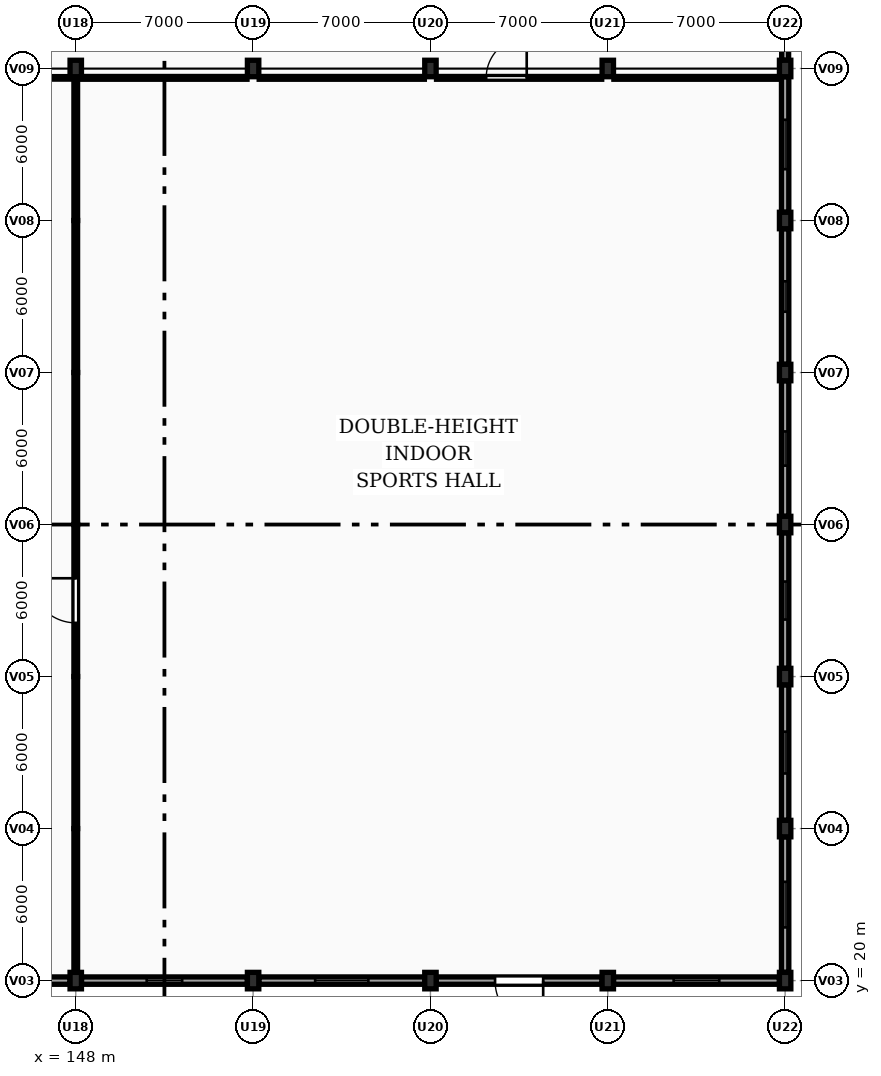
"""IFC4 building model, lengths in metres.
Left out: names, types, materials, properties, quantities, classifications, styles, units other than length and angle.
Written with IfcOpenShell. Run it as: python <this file> out.ifc"""

import sys

from ifc_helpers import new_model, si_unit, direction, frame, frame_2d, origin, origin_2d, place, context, subcontext, project, spatial, rectangle, extrude, element, fill, save


model = new_model("IFC4")
c1 = context("Model", 3, precision=1e-05, world=origin(), true_north=direction((0.0, 1.0)))
c2 = subcontext(c1, "Body", "Model", "MODEL_VIEW")
j1 = project(units=[si_unit("LENGTHUNIT", "METRE"), si_unit("PLANEANGLEUNIT", "RADIAN")], contexts=[c1])
p1 = place(None, origin())
s1 = spatial("IfcSite", under=j1, at=p1, CompositionType="ELEMENT")
p2 = place(p1, origin())
s2 = spatial("IfcBuilding", under=s1, at=p2, CompositionType="ELEMENT")
p3 = place(p2, origin())
s3 = spatial("IfcBuildingStorey", under=s2, at=p3, CompositionType="ELEMENT", Elevation=0.0)
for number, where, z_axis, x_axis in (
    (1, (148.0, 20.0, -0.2), (0.0, 0.0, 1.0), (1.0, 0.0, 0.0)),
    (2, (148.0, 56.0, -0.2), (0.0, 0.0, 1.0), (1.0, 0.0, 0.0)),
    (3, (155.0, 20.0, -0.2), (0.0, 0.0, 1.0), (1.0, 0.0, 0.0)),
    (4, (155.0, 56.0, -0.2), (0.0, 0.0, 1.0), (1.0, 0.0, 0.0)),
    (5, (162.0, 20.0, -0.2), (0.0, 0.0, 1.0), (1.0, 0.0, 0.0)),
    (6, (162.0, 56.0, -0.2), (0.0, 0.0, 1.0), (1.0, 0.0, 0.0)),
    (7, (169.0, 20.0, -0.2), (0.0, 0.0, 1.0), (1.0, 0.0, 0.0)),
    (8, (169.0, 56.0, -0.2), (0.0, 0.0, 1.0), (1.0, 0.0, 0.0)),
    (9, (176.0, 20.0, -0.2), (0.0, 0.0, 1.0), (1.0, 0.0, 0.0)),
    (10, (176.0, 26.0, -0.2), (0.0, 0.0, 1.0), (1.0, 0.0, 0.0)),
    (11, (176.0, 32.0, -0.2), (0.0, 0.0, 1.0), (1.0, 0.0, 0.0)),
    (12, (176.0, 38.0, -0.2), (0.0, 0.0, 1.0), (1.0, 0.0, 0.0)),
    (13, (176.0, 44.0, -0.2), (0.0, 0.0, 1.0), (1.0, 0.0, 0.0)),
    (14, (176.0, 50.0, -0.2), (0.0, 0.0, 1.0), (1.0, 0.0, 0.0)),
    (15, (176.0, 56.0, -0.2), (0.0, 0.0, 1.0), (1.0, 0.0, 0.0)),
):
    element("IfcColumn", number, at=place(p3, frame(where, z_axis=z_axis, x_axis=x_axis)), inside=s3, PredefinedType="COLUMN", context=c2, shape_type="SweptSolid", body=[
        extrude(rectangle(XDim=0.45, YDim=0.65, at=origin_2d()), origin(), (0.0, 0.0, 1.0), 4.7),
    ])
p4 = place(p3, frame((175.775, 20.0, 0.0), z_axis=(0.0, 0.0, 1.0), x_axis=(-1.0, 0.0, 0.0)))
e16 = element("IfcWall", 16, at=p4, inside=s3, PredefinedType="SOLIDWALL", context=c2, shape_type="SweptSolid", body=[
    extrude(rectangle(XDim=6.55, YDim=0.29, at=frame_2d((3.275, 0.0))), origin(), (0.0, 0.0, 1.0), 3.54),
])
p5 = place(p4, frame((2.375, 0.0, 0.95)))
e17 = element("IfcOpeningElement", 17, at=p5, cuts=e16, PredefinedType="OPENING", context=c2, shape_type="SweptSolid", body=[
    extrude(rectangle(XDim=1.8, YDim=1.2, at=frame_2d((0.9, 0.6))), frame((0.0, 0.155, 0.0), z_axis=(0.0, -1.0, 0.0), x_axis=(1.0, 0.0, 0.0)), (0.0, 0.0, 1.0), 0.31),
])
p6 = place(p3, frame((168.775, 20.0, 0.0), z_axis=(0.0, 0.0, 1.0), x_axis=(-1.0, 0.0, 0.0)))
e18 = element("IfcWall", 18, at=p6, inside=s3, PredefinedType="SOLIDWALL", context=c2, shape_type="SweptSolid", body=[
    extrude(rectangle(XDim=6.55, YDim=0.29, at=frame_2d((3.275, 0.0))), origin(), (0.0, 0.0, 1.0), 3.54),
])
p7 = place(p6, frame((2.325, 0.0, 0.0)))
e19 = element("IfcOpeningElement", 19, at=p7, cuts=e18, PredefinedType="OPENING", context=c2, shape_type="SweptSolid", body=[
    extrude(rectangle(XDim=1.9, YDim=2.25, at=frame_2d((0.95, 1.125))), frame((0.0, 0.155, 0.0), z_axis=(0.0, -1.0, 0.0), x_axis=(1.0, 0.0, 0.0)), (0.0, 0.0, 1.0), 0.31),
])
p8 = place(p3, frame((161.775, 20.0, 0.0), z_axis=(0.0, 0.0, 1.0), x_axis=(-1.0, 0.0, 0.0)))
e20 = element("IfcWall", 20, at=p8, inside=s3, PredefinedType="SOLIDWALL", context=c2, shape_type="SweptSolid", body=[
    extrude(rectangle(XDim=6.55, YDim=0.29, at=frame_2d((3.275, 0.0))), origin(), (0.0, 0.0, 1.0), 3.54),
])
p9 = place(p8, frame((2.225, 0.0, 0.95)))
e21 = element("IfcOpeningElement", 21, at=p9, cuts=e20, PredefinedType="OPENING", context=c2, shape_type="SweptSolid", body=[
    extrude(rectangle(XDim=2.1, YDim=1.2, at=frame_2d((1.05, 0.6))), frame((0.0, 0.155, 0.0), z_axis=(0.0, -1.0, 0.0), x_axis=(1.0, 0.0, 0.0)), (0.0, 0.0, 1.0), 0.31),
])
p10 = place(p3, frame((154.775, 20.0, 0.0), z_axis=(0.0, 0.0, 1.0), x_axis=(-1.0, 0.0, 0.0)))
e22 = element("IfcWall", 22, at=p10, inside=s3, PredefinedType="SOLIDWALL", context=c2, shape_type="SweptSolid", body=[
    extrude(rectangle(XDim=6.55, YDim=0.29, at=frame_2d((3.275, 0.0))), origin(), (0.0, 0.0, 1.0), 3.54),
])
p11 = place(p10, frame((2.575, 0.0, 0.95)))
e23 = element("IfcOpeningElement", 23, at=p11, cuts=e22, PredefinedType="OPENING", context=c2, shape_type="SweptSolid", body=[
    extrude(rectangle(XDim=1.4, YDim=1.8, at=frame_2d((0.7, 0.9))), frame((0.0, 0.155, 0.0), z_axis=(0.0, -1.0, 0.0), x_axis=(1.0, 0.0, 0.0)), (0.0, 0.0, 1.0), 0.31),
])
p12 = place(p3, frame((147.775, 20.0, 0.0), z_axis=(0.0, 0.0, 1.0), x_axis=(-1.0, 0.0, 0.0)))
e24 = element("IfcWall", 24, at=p12, inside=s3, PredefinedType="SOLIDWALL", context=c2, shape_type="SweptSolid", body=[
    extrude(rectangle(XDim=6.55, YDim=0.29, at=frame_2d((3.275, 0.0))), origin(), (0.0, 0.0, 1.0), 3.54),
])
p13 = place(p12, frame((2.425, 0.0, 0.95)))
e25 = element("IfcOpeningElement", 25, at=p13, cuts=e24, PredefinedType="OPENING", context=c2, shape_type="SweptSolid", body=[
    extrude(rectangle(XDim=1.7, YDim=1.8, at=frame_2d((0.85, 0.9))), frame((0.0, 0.155, 0.0), z_axis=(0.0, -1.0, 0.0), x_axis=(1.0, 0.0, 0.0)), (0.0, 0.0, 1.0), 0.31),
])
p14 = place(p3, frame((176.0, 55.675, 0.0), z_axis=(0.0, 0.0, 1.0), x_axis=(0.0, -1.0, 0.0)))
e26 = element("IfcWall", 26, at=p14, inside=s3, PredefinedType="SOLIDWALL", context=c2, shape_type="SweptSolid", body=[
    extrude(rectangle(XDim=5.35, YDim=0.29, at=frame_2d((2.675, 0.0))), origin(), (0.0, 0.0, 1.0), 3.54),
])
p15 = place(p14, frame((1.7, 0.0, 0.95)))
e27 = element("IfcOpeningElement", 27, at=p15, cuts=e26, PredefinedType="OPENING", context=c2, shape_type="SweptSolid", body=[
    extrude(rectangle(XDim=1.95, YDim=1.4, at=frame_2d((0.975, 0.7))), frame((0.0, 0.155, 0.0), z_axis=(0.0, -1.0, 0.0), x_axis=(1.0, 0.0, 0.0)), (0.0, 0.0, 1.0), 0.31),
])
p16 = place(p3, frame((176.0, 49.675, 0.0), z_axis=(0.0, 0.0, 1.0), x_axis=(0.0, -1.0, 0.0)))
e28 = element("IfcWall", 28, at=p16, inside=s3, PredefinedType="SOLIDWALL", context=c2, shape_type="SweptSolid", body=[
    extrude(rectangle(XDim=5.35, YDim=0.29, at=frame_2d((2.675, 0.0))), origin(), (0.0, 0.0, 1.0), 3.54),
])
p17 = place(p16, frame((2.075, 0.0, 0.95)))
e29 = element("IfcOpeningElement", 29, at=p17, cuts=e28, PredefinedType="OPENING", context=c2, shape_type="SweptSolid", body=[
    extrude(rectangle(XDim=1.2, YDim=1.5, at=frame_2d((0.6, 0.75))), frame((0.0, 0.155, 0.0), z_axis=(0.0, -1.0, 0.0), x_axis=(1.0, 0.0, 0.0)), (0.0, 0.0, 1.0), 0.31),
])
p18 = place(p3, frame((176.0, 43.675, 0.0), z_axis=(0.0, 0.0, 1.0), x_axis=(0.0, -1.0, 0.0)))
e30 = element("IfcWall", 30, at=p18, inside=s3, PredefinedType="SOLIDWALL", context=c2, shape_type="SweptSolid", body=[
    extrude(rectangle(XDim=5.35, YDim=0.29, at=frame_2d((2.675, 0.0))), origin(), (0.0, 0.0, 1.0), 3.54),
])
p19 = place(p18, frame((2.0, 0.0, 0.95)))
e31 = element("IfcOpeningElement", 31, at=p19, cuts=e30, PredefinedType="OPENING", context=c2, shape_type="SweptSolid", body=[
    extrude(rectangle(XDim=1.35, YDim=1.5, at=frame_2d((0.675, 0.75))), frame((0.0, 0.155, 0.0), z_axis=(0.0, -1.0, 0.0), x_axis=(1.0, 0.0, 0.0)), (0.0, 0.0, 1.0), 0.31),
])
p20 = place(p3, frame((176.0, 37.675, 0.0), z_axis=(0.0, 0.0, 1.0), x_axis=(0.0, -1.0, 0.0)))
e32 = element("IfcWall", 32, at=p20, inside=s3, PredefinedType="SOLIDWALL", context=c2, shape_type="SweptSolid", body=[
    extrude(rectangle(XDim=5.35, YDim=0.29, at=frame_2d((2.675, 0.0))), origin(), (0.0, 0.0, 1.0), 3.54),
])
p21 = place(p20, frame((1.925, 0.0, 0.95)))
e33 = element("IfcOpeningElement", 33, at=p21, cuts=e32, PredefinedType="OPENING", context=c2, shape_type="SweptSolid", body=[
    extrude(rectangle(XDim=1.5, YDim=1.5, at=frame_2d((0.75, 0.75))), frame((0.0, 0.155, 0.0), z_axis=(0.0, -1.0, 0.0), x_axis=(1.0, 0.0, 0.0)), (0.0, 0.0, 1.0), 0.31),
])
p22 = place(p3, frame((176.0, 31.675, 0.0), z_axis=(0.0, 0.0, 1.0), x_axis=(0.0, -1.0, 0.0)))
e34 = element("IfcWall", 34, at=p22, inside=s3, PredefinedType="SOLIDWALL", context=c2, shape_type="SweptSolid", body=[
    extrude(rectangle(XDim=5.35, YDim=0.29, at=frame_2d((2.675, 0.0))), origin(), (0.0, 0.0, 1.0), 3.54),
])
p23 = place(p22, frame((1.85, 0.0, 0.95)))
e35 = element("IfcOpeningElement", 35, at=p23, cuts=e34, PredefinedType="OPENING", context=c2, shape_type="SweptSolid", body=[
    extrude(rectangle(XDim=1.65, YDim=1.5, at=frame_2d((0.825, 0.75))), frame((0.0, 0.155, 0.0), z_axis=(0.0, -1.0, 0.0), x_axis=(1.0, 0.0, 0.0)), (0.0, 0.0, 1.0), 0.31),
])
p24 = place(p3, frame((176.0, 25.675, 0.0), z_axis=(0.0, 0.0, 1.0), x_axis=(0.0, -1.0, 0.0)))
e36 = element("IfcWall", 36, at=p24, inside=s3, PredefinedType="SOLIDWALL", context=c2, shape_type="SweptSolid", body=[
    extrude(rectangle(XDim=5.35, YDim=0.29, at=frame_2d((2.675, 0.0))), origin(), (0.0, 0.0, 1.0), 3.54),
])
p25 = place(p24, frame((1.775, 0.0, 0.95)))
e37 = element("IfcOpeningElement", 37, at=p25, cuts=e36, PredefinedType="OPENING", context=c2, shape_type="SweptSolid", body=[
    extrude(rectangle(XDim=1.8, YDim=1.5, at=frame_2d((0.9, 0.75))), frame((0.0, 0.155, 0.0), z_axis=(0.0, -1.0, 0.0), x_axis=(1.0, 0.0, 0.0)), (0.0, 0.0, 1.0), 0.31),
])
p26 = place(p3, frame((176.0, 63.75, 0.0), z_axis=(0.0, 0.0, 1.0), x_axis=(0.0, -1.0, 0.0)))
e38 = element("IfcWall", 38, at=p26, inside=s3, PredefinedType="SOLIDWALL", context=c2, shape_type="SweptSolid", body=[
    extrude(rectangle(XDim=7.425, YDim=0.275, at=frame_2d((3.712, 0.0))), origin(), (0.0, 0.0, 1.0), 3.515),
])
p27 = place(p26, frame((2.712, 0.0, 0.95)))
e39 = element("IfcOpeningElement", 39, at=p27, cuts=e38, PredefinedType="OPENING", context=c2, shape_type="SweptSolid", body=[
    extrude(rectangle(XDim=2.0, YDim=1.5, at=frame_2d((1.0, 0.75))), frame((0.0, 0.147, 0.0), z_axis=(0.0, -1.0, 0.0), x_axis=(1.0, 0.0, 0.0)), (0.0, 0.0, 1.0), 0.295),
])
p28 = place(p3, frame((148.0, 20.34, 0.0), z_axis=(0.0, 0.0, 1.0), x_axis=(0.0, 1.0, 0.0)))
e40 = element("IfcWall", 40, at=p28, inside=s3, PredefinedType="MOVABLE", context=c2, shape_type="SweptSolid", body=[
    extrude(rectangle(XDim=5.66, YDim=0.145, at=frame_2d((2.83, 0.0))), origin(), (0.0, 0.0, 1.0), 8.8),
])
p29 = place(p3, frame((148.0, 26.0, 0.0), z_axis=(0.0, 0.0, 1.0), x_axis=(0.0, 1.0, 0.0)))
e41 = element("IfcWall", 41, at=p29, inside=s3, PredefinedType="MOVABLE", context=c2, shape_type="SweptSolid", body=[
    extrude(rectangle(XDim=6.0, YDim=0.145, at=frame_2d((3.0, 0.0))), origin(), (0.0, 0.0, 1.0), 8.8),
])
p30 = place(p3, frame((148.0, 32.0, 0.0), z_axis=(0.0, 0.0, 1.0), x_axis=(0.0, 1.0, 0.0)))
e42 = element("IfcWall", 42, at=p30, inside=s3, PredefinedType="MOVABLE", context=c2, shape_type="SweptSolid", body=[
    extrude(rectangle(XDim=6.0, YDim=0.145, at=frame_2d((3.0, 0.0))), origin(), (0.0, 0.0, 1.0), 8.8),
])
p31 = place(p30, frame((2.12, 0.0, 0.0)))
e43 = element("IfcOpeningElement", 43, at=p31, cuts=e42, PredefinedType="OPENING", context=c2, shape_type="SweptSolid", body=[
    extrude(rectangle(XDim=1.76, YDim=2.2, at=frame_2d((0.88, 1.1))), frame((0.0, 0.083, 0.0), z_axis=(0.0, -1.0, 0.0), x_axis=(1.0, 0.0, 0.0)), (0.0, 0.0, 1.0), 0.165),
])
for number, where, z_axis, x_axis in (
    (44, (148.0, 38.0, 0.0), (0.0, 0.0, 1.0), (0.0, 1.0, 0.0)),
    (45, (148.0, 44.0, 0.0), (0.0, 0.0, 1.0), (0.0, 1.0, 0.0)),
):
    element("IfcWall", number, at=place(p3, frame(where, z_axis=z_axis, x_axis=x_axis)), inside=s3, PredefinedType="MOVABLE", context=c2, shape_type="SweptSolid", body=[
        extrude(rectangle(XDim=6.0, YDim=0.145, at=frame_2d((3.0, 0.0))), origin(), (0.0, 0.0, 1.0), 8.8),
    ])
p32 = place(p3, frame((148.0, 50.0, 0.0), z_axis=(0.0, 0.0, 1.0), x_axis=(0.0, 1.0, 0.0)))
e46 = element("IfcWall", 46, at=p32, inside=s3, PredefinedType="MOVABLE", context=c2, shape_type="SweptSolid", body=[
    extrude(rectangle(XDim=5.66, YDim=0.145, at=frame_2d((2.83, 0.0))), origin(), (0.0, 0.0, 1.0), 8.8),
])
p33 = place(p3, frame((141.24, 55.63, 0.0), z_axis=(0.0, 0.0, 1.0), x_axis=(1.0, 0.0, 0.0)))
e47 = element("IfcWall", 47, at=p33, inside=s3, PredefinedType="PARTITIONING", context=c2, shape_type="SweptSolid", body=[
    extrude(rectangle(XDim=6.52, YDim=0.1, at=frame_2d((3.26, 0.0))), origin(), (0.0, 0.0, 1.0), 3.565),
])
for number, where, z_axis, x_axis in (
    (48, (148.24, 55.63, 0.0), (0.0, 0.0, 1.0), (1.0, 0.0, 0.0)),
    (49, (155.24, 55.63, 0.0), (0.0, 0.0, 1.0), (1.0, 0.0, 0.0)),
):
    element("IfcWall", number, at=place(p3, frame(where, z_axis=z_axis, x_axis=x_axis)), inside=s3, PredefinedType="PARTITIONING", context=c2, shape_type="SweptSolid", body=[
        extrude(rectangle(XDim=6.52, YDim=0.11, at=frame_2d((3.26, 0.0))), origin(), (0.0, 0.0, 1.0), 3.565),
    ])
p34 = place(p3, frame((162.24, 55.63, 0.0), z_axis=(0.0, 0.0, 1.0), x_axis=(1.0, 0.0, 0.0)))
e50 = element("IfcWall", 50, at=p34, inside=s3, PredefinedType="PARTITIONING", context=c2, shape_type="SweptSolid", body=[
    extrude(rectangle(XDim=6.52, YDim=0.11, at=frame_2d((3.26, 0.0))), origin(), (0.0, 0.0, 1.0), 3.565),
])
p35 = place(p34, frame((1.96, 0.0, 0.0)))
e51 = element("IfcOpeningElement", 51, at=p35, cuts=e50, PredefinedType="OPENING", context=c2, shape_type="SweptSolid", body=[
    extrude(rectangle(XDim=1.6, YDim=2.2, at=frame_2d((0.8, 1.1))), frame((0.0, 0.065, 0.0), z_axis=(0.0, -1.0, 0.0), x_axis=(1.0, 0.0, 0.0)), (0.0, 0.0, 1.0), 0.13),
])
p36 = place(p3, frame((169.24, 55.63, 0.0), z_axis=(0.0, 0.0, 1.0), x_axis=(1.0, 0.0, 0.0)))
e52 = element("IfcWall", 52, at=p36, inside=s3, PredefinedType="PARTITIONING", context=c2, shape_type="SweptSolid", body=[
    extrude(rectangle(XDim=6.52, YDim=0.11, at=frame_2d((3.26, 0.0))), origin(), (0.0, 0.0, 1.0), 3.565),
])
p37 = place(p5, origin())
e53 = element("IfcWindow", 53, at=p37, inside=s3, PartitioningType="DOUBLE_PANEL_VERTICAL", PredefinedType="WINDOW", context=c2, shape_type="SweptSolid", body=[
    extrude(rectangle(XDim=1.8, YDim=1.2, at=frame_2d((0.9, 0.6))), frame((0.0, 0.03, 0.0), z_axis=(0.0, -1.0, 0.0), x_axis=(1.0, 0.0, 0.0)), (0.0, 0.0, 1.0), 0.06),
])
fill(e17, e53)
p38 = place(p7, origin())
e54 = element("IfcDoor", 54, at=p38, inside=s3, OperationType="SINGLE_SWING_LEFT", PredefinedType="DOOR", context=c2, shape_type="SweptSolid", body=[
    extrude(rectangle(XDim=1.9, YDim=2.25, at=frame_2d((0.95, 1.125))), frame((0.0, 0.025, 0.0), z_axis=(0.0, -1.0, 0.0), x_axis=(1.0, 0.0, 0.0)), (0.0, 0.0, 1.0), 0.05),
])
fill(e19, e54)
p39 = place(p9, origin())
e55 = element("IfcWindow", 55, at=p39, inside=s3, PartitioningType="DOUBLE_PANEL_VERTICAL", PredefinedType="WINDOW", context=c2, shape_type="SweptSolid", body=[
    extrude(rectangle(XDim=2.1, YDim=1.2, at=frame_2d((1.05, 0.6))), frame((0.0, 0.03, 0.0), z_axis=(0.0, -1.0, 0.0), x_axis=(1.0, 0.0, 0.0)), (0.0, 0.0, 1.0), 0.06),
])
fill(e21, e55)
p40 = place(p11, origin())
e56 = element("IfcWindow", 56, at=p40, inside=s3, PartitioningType="SINGLE_PANEL", PredefinedType="WINDOW", context=c2, shape_type="SweptSolid", body=[
    extrude(rectangle(XDim=1.4, YDim=1.8, at=frame_2d((0.7, 0.9))), frame((0.0, 0.03, 0.0), z_axis=(0.0, -1.0, 0.0), x_axis=(1.0, 0.0, 0.0)), (0.0, 0.0, 1.0), 0.06),
])
fill(e23, e56)
p41 = place(p15, origin())
e57 = element("IfcWindow", 57, at=p41, inside=s3, PartitioningType="DOUBLE_PANEL_VERTICAL", PredefinedType="WINDOW", context=c2, shape_type="SweptSolid", body=[
    extrude(rectangle(XDim=1.95, YDim=1.4, at=frame_2d((0.975, 0.7))), frame((0.0, 0.03, 0.0), z_axis=(0.0, -1.0, 0.0), x_axis=(1.0, 0.0, 0.0)), (0.0, 0.0, 1.0), 0.06),
])
fill(e27, e57)
p42 = place(p17, origin())
e58 = element("IfcWindow", 58, at=p42, inside=s3, PartitioningType="SINGLE_PANEL", PredefinedType="WINDOW", context=c2, shape_type="SweptSolid", body=[
    extrude(rectangle(XDim=1.2, YDim=1.5, at=frame_2d((0.6, 0.75))), frame((0.0, 0.03, 0.0), z_axis=(0.0, -1.0, 0.0), x_axis=(1.0, 0.0, 0.0)), (0.0, 0.0, 1.0), 0.06),
])
fill(e29, e58)
p43 = place(p19, origin())
e59 = element("IfcWindow", 59, at=p43, inside=s3, PartitioningType="SINGLE_PANEL", PredefinedType="WINDOW", context=c2, shape_type="SweptSolid", body=[
    extrude(rectangle(XDim=1.35, YDim=1.5, at=frame_2d((0.675, 0.75))), frame((0.0, 0.03, 0.0), z_axis=(0.0, -1.0, 0.0), x_axis=(1.0, 0.0, 0.0)), (0.0, 0.0, 1.0), 0.06),
])
fill(e31, e59)
p44 = place(p21, origin())
e60 = element("IfcWindow", 60, at=p44, inside=s3, PartitioningType="SINGLE_PANEL", PredefinedType="WINDOW", context=c2, shape_type="SweptSolid", body=[
    extrude(rectangle(XDim=1.5, YDim=1.5, at=frame_2d((0.75, 0.75))), frame((0.0, 0.03, 0.0), z_axis=(0.0, -1.0, 0.0), x_axis=(1.0, 0.0, 0.0)), (0.0, 0.0, 1.0), 0.06),
])
fill(e33, e60)
p45 = place(p23, origin())
e61 = element("IfcWindow", 61, at=p45, inside=s3, PartitioningType="DOUBLE_PANEL_VERTICAL", PredefinedType="WINDOW", context=c2, shape_type="SweptSolid", body=[
    extrude(rectangle(XDim=1.65, YDim=1.5, at=frame_2d((0.825, 0.75))), frame((0.0, 0.03, 0.0), z_axis=(0.0, -1.0, 0.0), x_axis=(1.0, 0.0, 0.0)), (0.0, 0.0, 1.0), 0.06),
])
fill(e35, e61)
p46 = place(p25, origin())
e62 = element("IfcWindow", 62, at=p46, inside=s3, PartitioningType="DOUBLE_PANEL_VERTICAL", PredefinedType="WINDOW", context=c2, shape_type="SweptSolid", body=[
    extrude(rectangle(XDim=1.8, YDim=1.5, at=frame_2d((0.9, 0.75))), frame((0.0, 0.03, 0.0), z_axis=(0.0, -1.0, 0.0), x_axis=(1.0, 0.0, 0.0)), (0.0, 0.0, 1.0), 0.06),
])
fill(e37, e62)
p47 = place(p31, origin())
e63 = element("IfcDoor", 63, at=p47, inside=s3, OperationType="SINGLE_SWING_RIGHT", PredefinedType="DOOR", context=c2, shape_type="SweptSolid", body=[
    extrude(rectangle(XDim=1.76, YDim=2.2, at=frame_2d((0.88, 1.1))), frame((0.0, 0.025, 0.0), z_axis=(0.0, -1.0, 0.0), x_axis=(1.0, 0.0, 0.0)), (0.0, 0.0, 1.0), 0.05),
])
fill(e43, e63)
p48 = place(p35, origin())
e64 = element("IfcDoor", 64, at=p48, inside=s3, OperationType="SINGLE_SWING_RIGHT", PredefinedType="DOOR", context=c2, shape_type="SweptSolid", body=[
    extrude(rectangle(XDim=1.6, YDim=2.2, at=frame_2d((0.8, 1.1))), frame((0.0, 0.025, 0.0), z_axis=(0.0, -1.0, 0.0), x_axis=(1.0, 0.0, 0.0)), (0.0, 0.0, 1.0), 0.05),
])
fill(e51, e64)
save(model, sys.argv[1])
